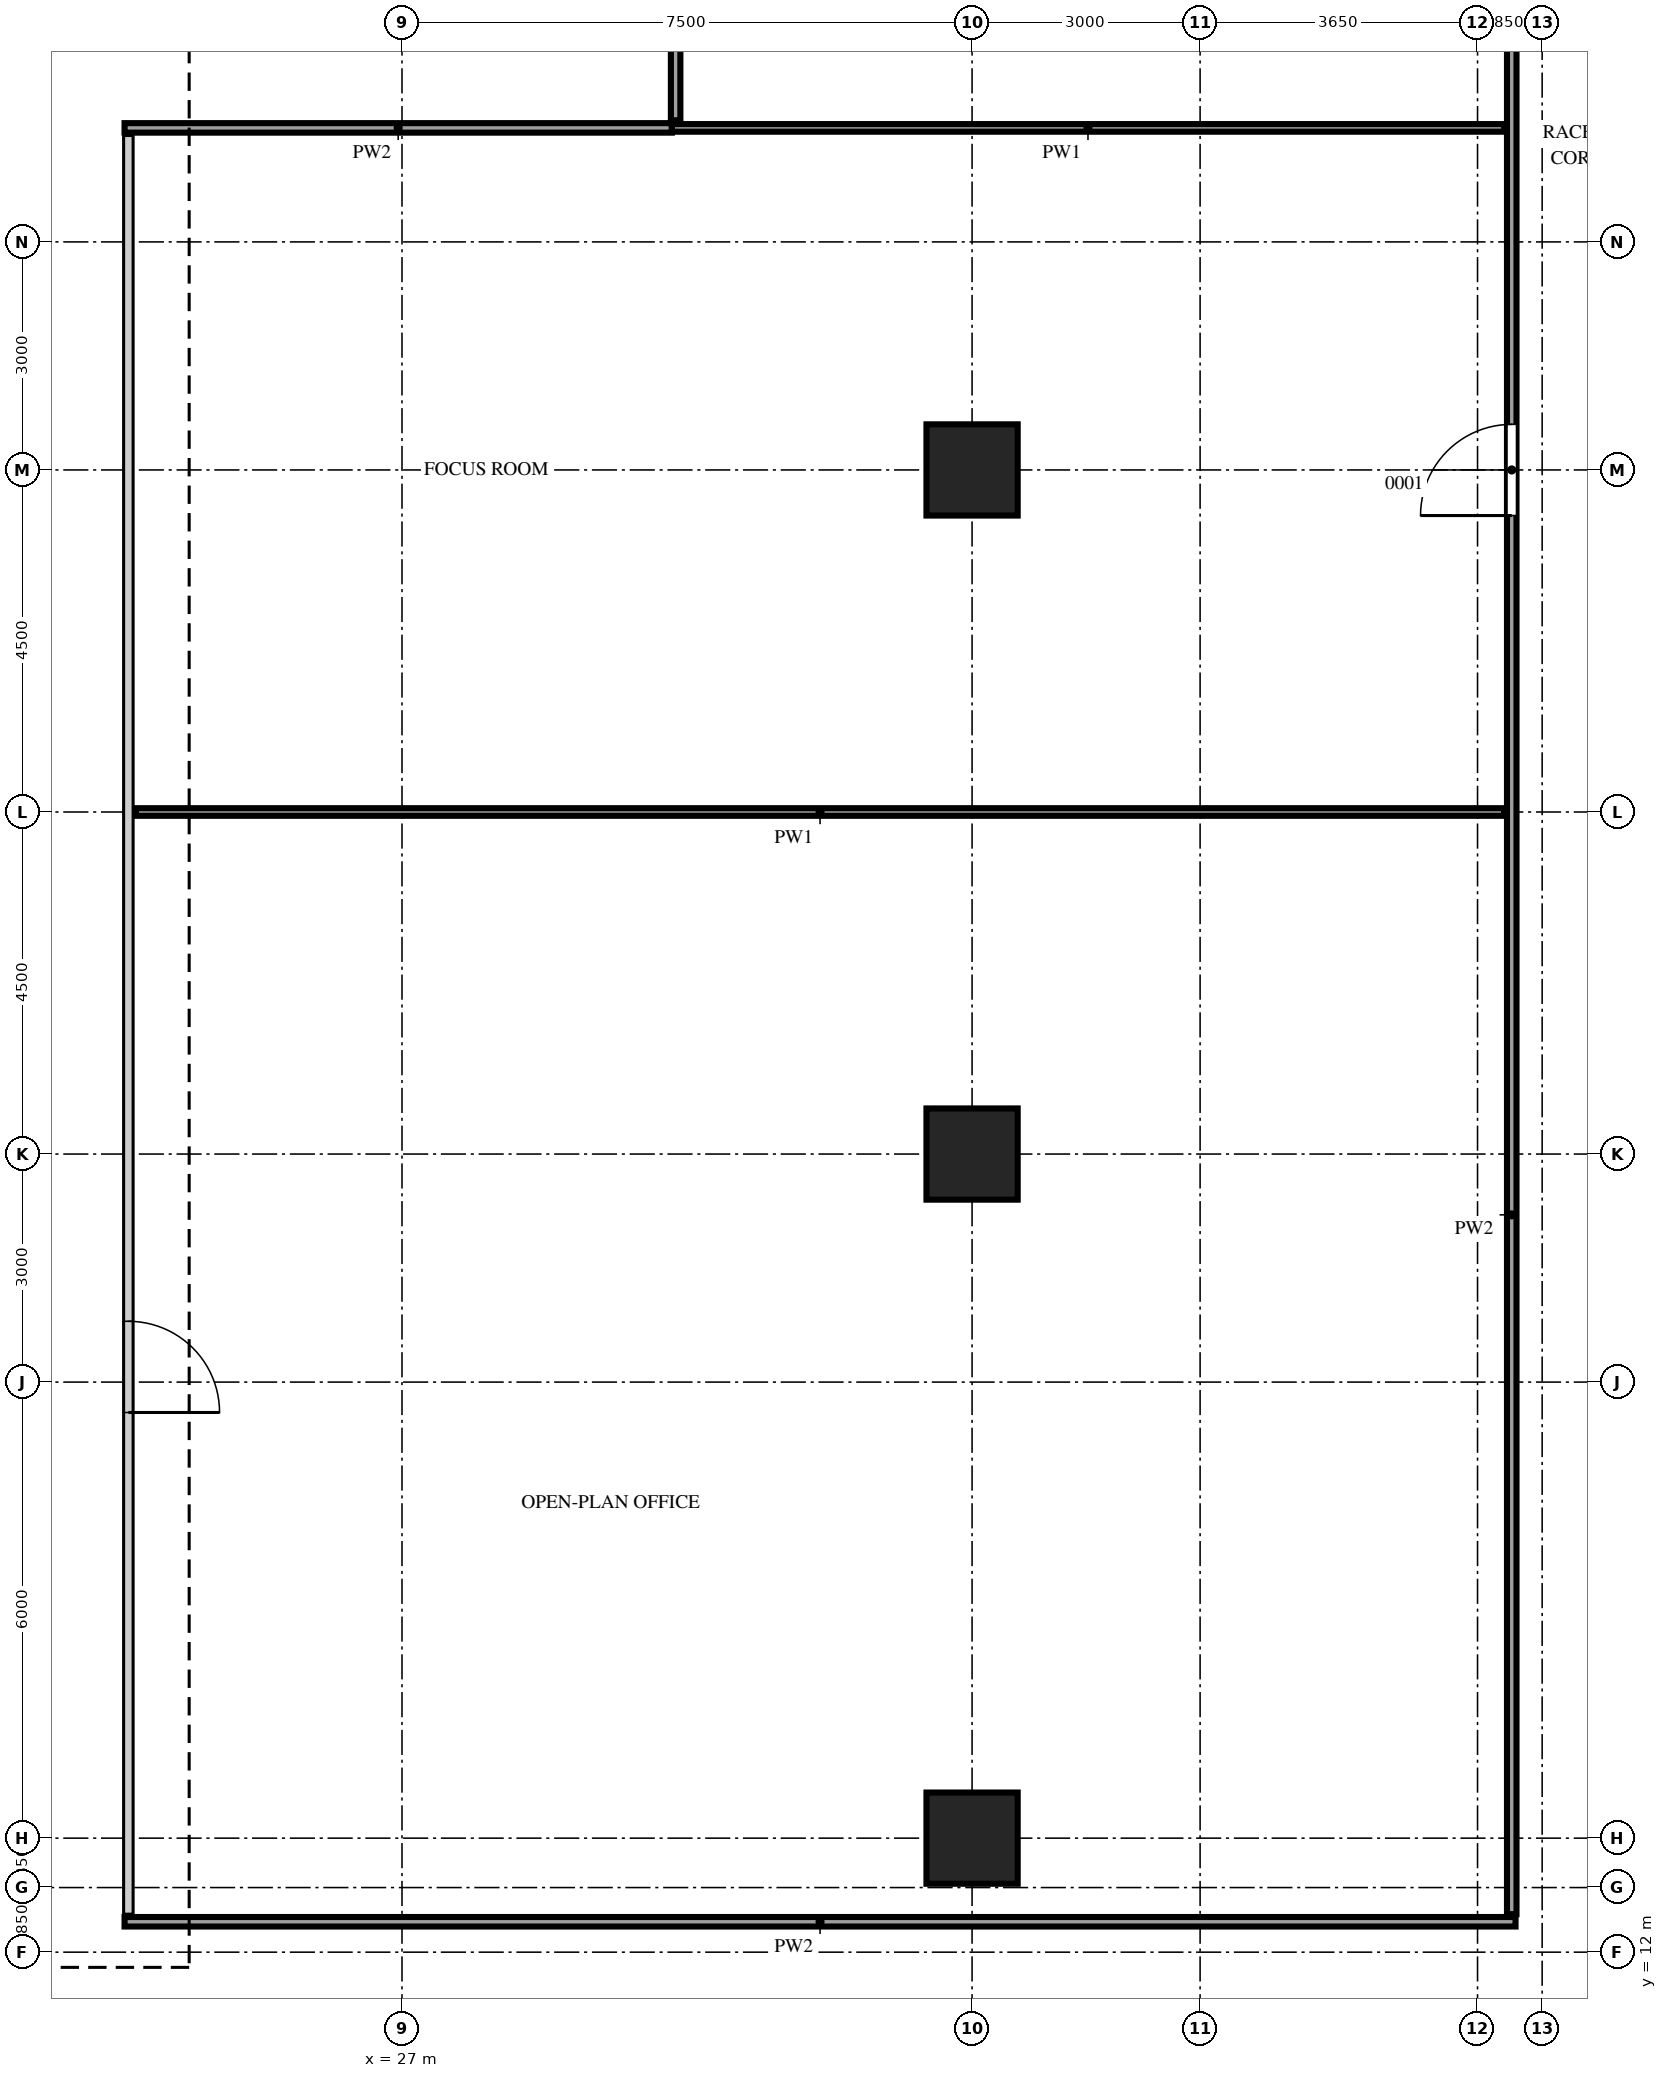
"""IFC4 building model, lengths in metres.
Left out: names, types, materials, properties, quantities, classifications, styles, units other than length and angle.
Written with IfcOpenShell. Run it as: python <this file> out.ifc"""

import sys

from ifc_helpers import new_model, si_unit, direction, frame, frame_2d, origin, origin_2d, place, context, subcontext, project, spatial, rectangle, extrude, source, transform, mapped, element, fill, save


model = new_model("IFC4")
c1 = context("Model", 3, precision=1e-05, world=origin(), true_north=direction((0.0, 1.0)))
c2 = subcontext(c1, "Body", "Model", "MODEL_VIEW")
j1 = project(units=[si_unit("LENGTHUNIT", "METRE"), si_unit("PLANEANGLEUNIT", "RADIAN")], contexts=[c1])
p1 = place(None, origin())
s1 = spatial("IfcSite", under=j1, at=p1, CompositionType="ELEMENT")
p2 = place(p1, origin())
s2 = spatial("IfcBuilding", under=s1, at=p2, CompositionType="ELEMENT")
p3 = place(p2, frame((0.0, 0.0, 196.7)))
s3 = spatial("IfcBuildingStorey", under=s2, at=p3, CompositionType="ELEMENT", Elevation=196.7)
m1 = source(origin(), c2, "Body", "SweptSolid", [
    extrude(rectangle(XDim=1.2, YDim=1.2, at=origin_2d()), origin(), (0.0, 0.0, 1.0), 3.75),
])
for number, where, z_axis, x_axis in (
    (1, (34.5, 13.5, 0.0), (0.0, 0.0, 1.0), (1.0, 0.0, 0.0)),
    (2, (34.5, 22.5, 0.0), (0.0, 0.0, 1.0), (1.0, 0.0, 0.0)),
    (3, (34.5, 31.5, 0.0), (0.0, 0.0, 1.0), (1.0, 0.0, 0.0)),
):
    element("IfcColumn", number, at=place(p3, frame(where, z_axis=z_axis, x_axis=x_axis)), inside=s3, PredefinedType="COLUMN", context=c2, shape_type="MappedRepresentation", body=[
        mapped(m1, transform((0.0, 0.0, 0.0))),
    ])
m2 = source(origin(), c2, "Body", "SweptSolid", [
    extrude(rectangle(XDim=18.3, YDim=0.125, at=frame_2d((9.15, 0.0))), origin(), (0.0, 0.0, 1.0), 3.8),
])
p4 = place(p3, frame((23.35, 12.4, 0.0), z_axis=(0.0, 0.0, 1.0), x_axis=(1.0, 0.0, 0.0)))
e4 = element("IfcWall", 4, at=p4, inside=s3, PredefinedType="PARTITIONING", context=c2, shape_type="MappedRepresentation", body=[
    mapped(m2, transform((0.0, 0.0, 0.0))),
])
m3 = source(origin(), c2, "Body", "SweptSolid", [
    extrude(rectangle(XDim=23.4, YDim=0.125, at=frame_2d((11.7, 0.0))), origin(), (0.0, 0.0, 1.0), 3.8),
])
p5 = place(p3, frame((23.4, 12.5, 0.0), z_axis=(0.0, 0.0, 1.0), x_axis=(0.0, 1.0, 0.0)))
e5 = element("IfcWall", 5, at=p5, inside=s3, PredefinedType="PARTITIONING", context=c2, shape_type="MappedRepresentation", body=[
    mapped(m3, transform((0.0, 0.0, 0.0))),
])
m4 = source(origin(), c2, "Body", "SweptSolid", [
    extrude(rectangle(XDim=1.2, YDim=2.1, at=frame_2d((0.6, 1.05))), frame((0.0, 0.073, 0.0), z_axis=(0.0, -1.0, 0.0), x_axis=(1.0, 0.0, 0.0)), (0.0, 0.0, 1.0), 0.145),
])
p6 = place(p5, frame((6.6, 0.0, 0.0)))
e6 = element("IfcOpeningElement", 6, at=p6, cuts=e5, PredefinedType="OPENING", context=c2, shape_type="MappedRepresentation", body=[
    mapped(m4, transform((0.0, 0.0, 0.0))),
])
m5 = source(origin(), c2, "Body", "SweptSolid", [
    extrude(rectangle(XDim=29.0, YDim=0.125, at=frame_2d((14.5, 0.0))), origin(), (0.0, 0.0, 1.0), 3.8),
])
p7 = place(p3, frame((41.6, 12.5, 0.0), z_axis=(0.0, 0.0, 1.0), x_axis=(0.0, 1.0, 0.0)))
e7 = element("IfcWall", 7, at=p7, inside=s3, PredefinedType="PARTITIONING", context=c2, shape_type="MappedRepresentation", body=[
    mapped(m5, transform((0.0, 0.0, 0.0))),
])
p8 = place(p7, frame((18.4, 0.0, 0.0)))
e8 = element("IfcOpeningElement", 8, at=p8, cuts=e7, PredefinedType="OPENING", context=c2, shape_type="MappedRepresentation", body=[
    mapped(m4, transform((0.0, 0.0, 0.0))),
])
m6 = source(origin(), c2, "Body", "SweptSolid", [
    extrude(rectangle(XDim=18.0, YDim=0.1, at=frame_2d((9.0, 0.0))), origin(), (0.0, 0.0, 1.0), 3.8),
])
p9 = place(p3, frame((23.5, 27.0, 0.0), z_axis=(0.0, 0.0, 1.0), x_axis=(1.0, 0.0, 0.0)))
e9 = element("IfcWall", 9, at=p9, inside=s3, PredefinedType="PARTITIONING", context=c2, shape_type="MappedRepresentation", body=[
    mapped(m6, transform((0.0, 0.0, 0.0))),
])
m7 = source(origin(), c2, "Body", "SweptSolid", [
    extrude(rectangle(XDim=7.2, YDim=0.125, at=frame_2d((3.6, 0.0))), origin(), (0.0, 0.0, 1.0), 3.8),
])
p10 = place(p3, frame((23.35, 36.0, 0.0), z_axis=(0.0, 0.0, 1.0), x_axis=(1.0, 0.0, 0.0)))
e10 = element("IfcWall", 10, at=p10, inside=s3, PredefinedType="PARTITIONING", context=c2, shape_type="MappedRepresentation", body=[
    mapped(m7, transform((0.0, 0.0, 0.0))),
])
m8 = source(origin(), c2, "Body", "SweptSolid", [
    extrude(rectangle(XDim=10.95, YDim=0.1, at=frame_2d((5.475, 0.0))), origin(), (0.0, 0.0, 1.0), 3.8),
])
p11 = place(p3, frame((30.55, 36.0, 0.0), z_axis=(0.0, 0.0, 1.0), x_axis=(1.0, 0.0, 0.0)))
e11 = element("IfcWall", 11, at=p11, inside=s3, PredefinedType="PARTITIONING", context=c2, shape_type="MappedRepresentation", body=[
    mapped(m8, transform((0.0, 0.0, 0.0))),
])
m9 = source(origin(), c2, "Body", "SweptSolid", [
    extrude(rectangle(XDim=5.4, YDim=0.125, at=frame_2d((2.7, 0.0))), origin(), (0.0, 0.0, 1.0), 3.8),
])
p12 = place(p3, frame((30.6, 36.1, 0.0), z_axis=(0.0, 0.0, 1.0), x_axis=(0.0, 1.0, 0.0)))
e12 = element("IfcWall", 12, at=p12, inside=s3, PredefinedType="PARTITIONING", context=c2, shape_type="MappedRepresentation", body=[
    mapped(m9, transform((0.0, 0.0, 0.0))),
])
m10 = source(origin(), c2, "Body", "SweptSolid", [
    extrude(rectangle(XDim=1.2, YDim=2.1, at=frame_2d((0.6, 1.05))), frame((0.0, 0.025, 0.0), z_axis=(0.0, -1.0, 0.0), x_axis=(1.0, 0.0, 0.0)), (0.0, 0.0, 1.0), 0.05),
])
p13 = place(p6, origin())
e13 = element("IfcDoor", 13, at=p13, inside=s3, OperationType="SINGLE_SWING_LEFT", PredefinedType="DOOR", context=c2, shape_type="MappedRepresentation", body=[
    mapped(m10, transform((0.0, 0.0, 0.0))),
])
fill(e6, e13)
p14 = place(p8, origin())
e14 = element("IfcDoor", 14, at=p14, inside=s3, OperationType="SINGLE_SWING_RIGHT", PredefinedType="DOOR", context=c2, shape_type="MappedRepresentation", body=[
    mapped(m10, transform((0.0, 0.0, 0.0))),
])
fill(e8, e14)
save(model, sys.argv[1])
